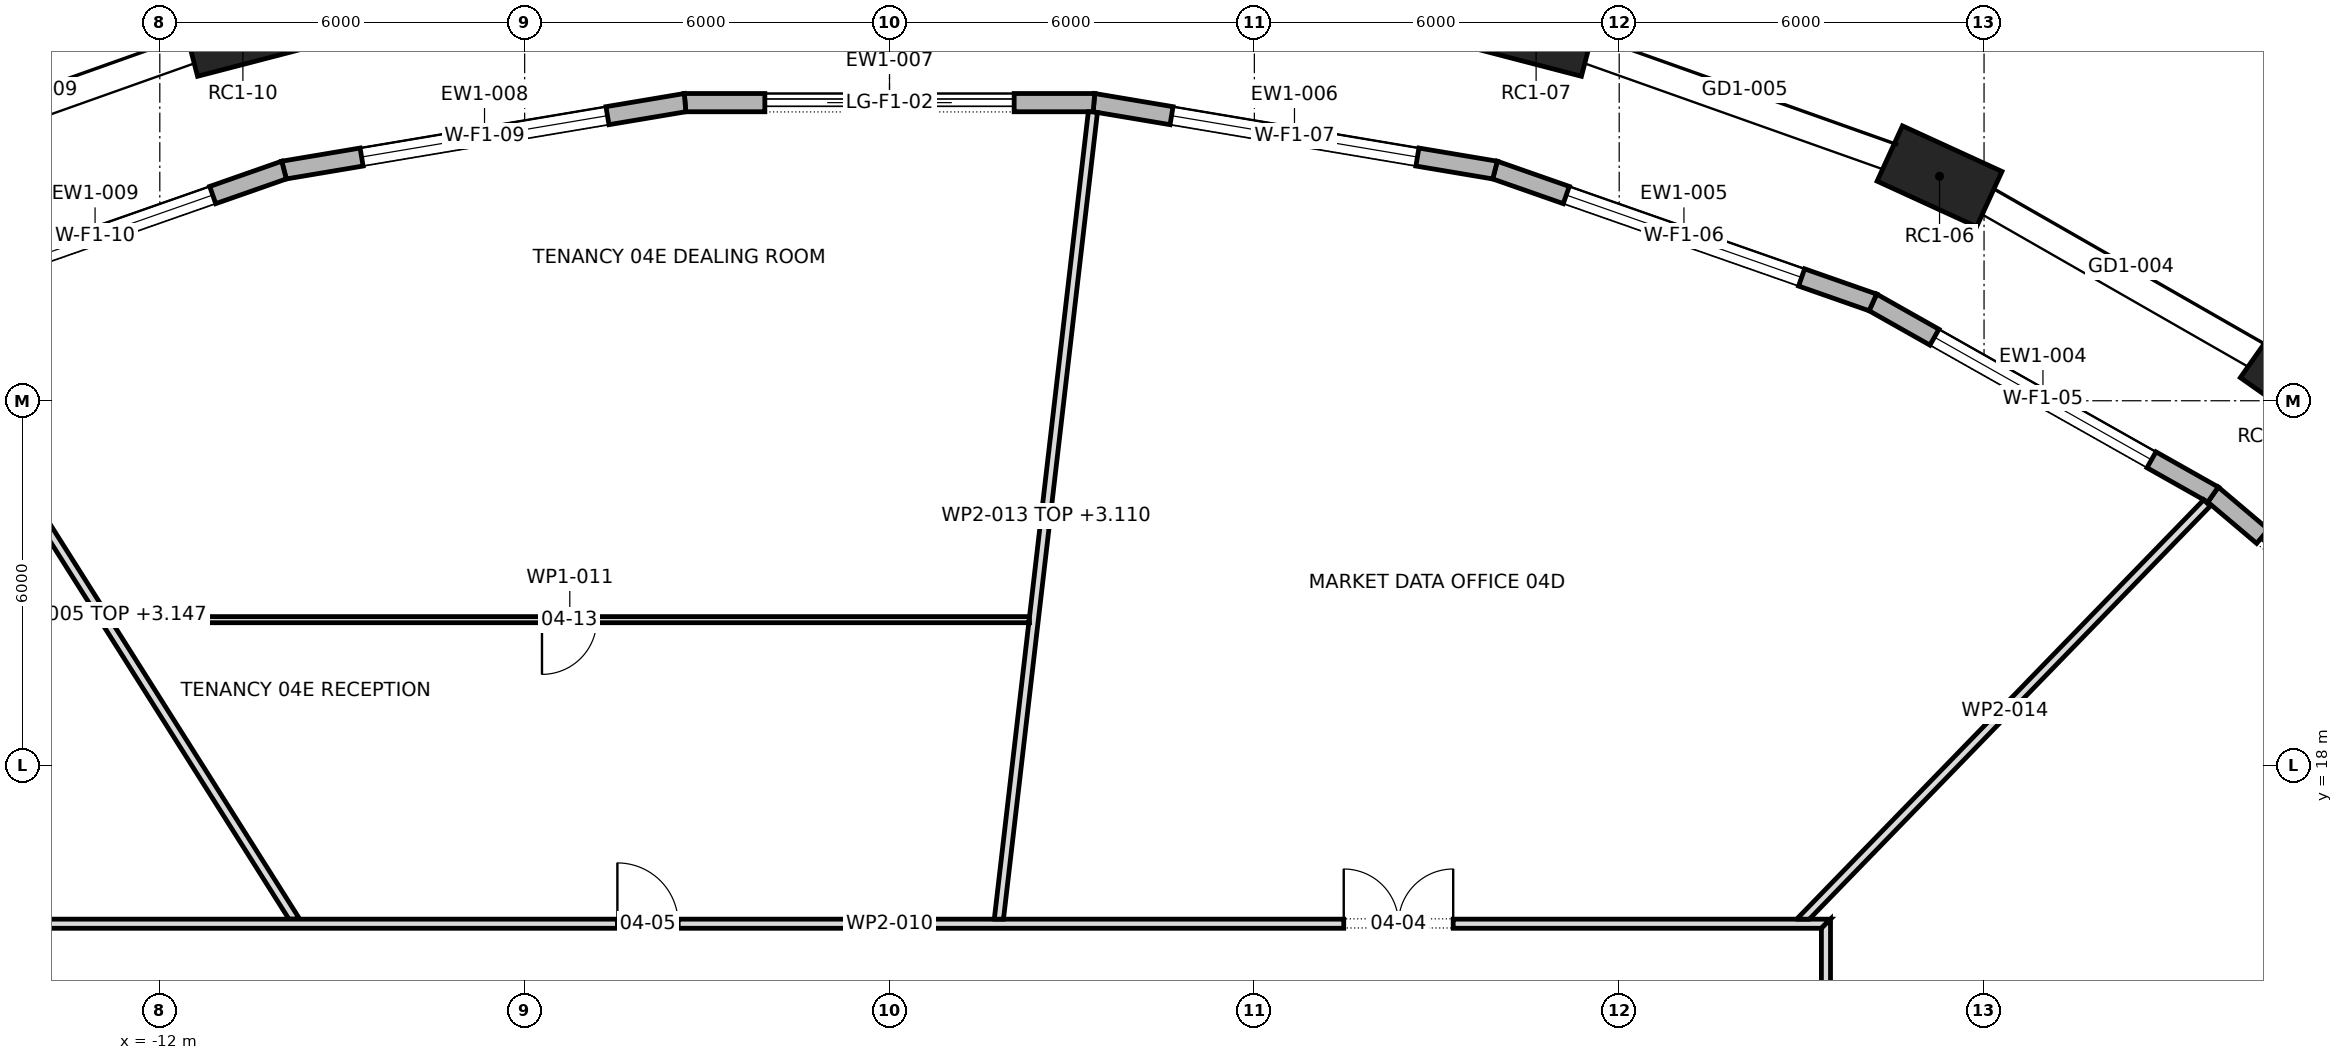
"""IFC4 building model, lengths in metres.
Left out: names, types, materials, properties, quantities, classifications, styles, units other than length and angle.
Written with IfcOpenShell. Run it as: python <this file> out.ifc"""

import sys

from ifc_helpers import new_model, si_unit, direction, frame, frame_2d, origin, origin_2d, place, context, subcontext, project, spatial, polyline, rectangle, outline, extrude, element, fill, save


model = new_model("IFC4")
c1 = context("Model", 3, precision=1e-05, world=origin(), true_north=direction((0.0, 1.0)))
c2 = subcontext(c1, "Body", "Model", "MODEL_VIEW")
j1 = project(units=[si_unit("LENGTHUNIT", "METRE"), si_unit("PLANEANGLEUNIT", "RADIAN")], contexts=[c1])
p1 = place(None, origin())
s1 = spatial("IfcSite", under=j1, at=p1, CompositionType="ELEMENT")
p2 = place(p1, origin())
s2 = spatial("IfcBuilding", under=s1, at=p2, CompositionType="ELEMENT")
p3 = place(p2, frame((0.0, 0.0, 69.7)))
s3 = spatial("IfcBuildingStorey", under=s2, at=p3, CompositionType="ELEMENT", Elevation=69.7)
for number, where, z_axis, x_axis in (
    (1, (23.239, 24.271, 0.0), (0.0, 0.0, 1.0), (-0.818, 0.575, 0.0)),
    (2, (17.268, 27.691, 0.0), (0.0, 0.0, 1.0), (-0.909, 0.417, 0.0)),
    (3, (10.634, 30.046, 0.0), (0.0, 0.0, 1.0), (-0.968, 0.252, 0.0)),
    (4, (-10.634, 30.046, 0.0), (0.0, 0.0, 1.0), (-0.968, -0.252, 0.0)),
):
    element("IfcColumn", number, at=place(p3, frame(where, z_axis=z_axis, x_axis=x_axis)), inside=s3, PredefinedType="COLUMN", context=c2, shape_type="SweptSolid", body=[
        extrude(rectangle(XDim=1.8, YDim=1.0, at=origin_2d()), origin(), (0.0, 0.0, 1.0), 4.2),
    ])
p4 = place(p3, frame((26.525, 18.434, 0.0), z_axis=(0.0, 0.0, 1.0), x_axis=(-0.763655167989, 0.645624336905, 0.0)))
e5 = element("IfcWall", 5, at=p4, inside=s3, PredefinedType="STANDARD", context=c2, shape_type="SweptSolid", body=[
    extrude(outline(polyline([(-0.015, -0.15), (6.246, -0.15), (6.218, 0.15), (0.015, 0.15), (-0.015, -0.15)])), origin(), (0.0, 0.0, 1.0), 3.9),
])
p5 = place(p4, frame((1.066, 0.0, 0.0)))
e6 = element("IfcOpeningElement", 6, at=p5, cuts=e5, PredefinedType="OPENING", context=c2, shape_type="SweptSolid", body=[
    extrude(rectangle(XDim=4.1, YDim=3.45, at=frame_2d((2.05, 1.725))), frame((0.0, 0.162, 0.0), z_axis=(0.0, -1.0, 0.0), x_axis=(1.0, 0.0, 0.0)), (0.0, 0.0, 1.0), 0.324),
])
p6 = place(p3, frame((21.766, 22.457, 0.0), z_axis=(0.0, 0.0, 1.0), x_axis=(-0.870673928577, 0.491860661262, 0.0)))
e7 = element("IfcWall", 7, at=p6, inside=s3, PredefinedType="STANDARD", context=c2, shape_type="SweptSolid", body=[
    extrude(outline(polyline([(-0.014, -0.15), (6.438, -0.15), (6.411, 0.15), (0.014, 0.15), (-0.014, -0.15)])), origin(), (0.0, 0.0, 1.0), 3.9),
])
p7 = place(p6, frame((1.163, 0.0, 0.6)))
e8 = element("IfcOpeningElement", 8, at=p7, cuts=e7, PredefinedType="OPENING", context=c2, shape_type="SweptSolid", body=[
    extrude(rectangle(XDim=4.1, YDim=2.85, at=frame_2d((2.05, 1.425))), frame((0.0, 0.162, 0.0), z_axis=(0.0, -1.0, 0.0), x_axis=(1.0, 0.0, 0.0)), (0.0, 0.0, 1.0), 0.324),
])
p8 = place(p3, frame((16.172, 25.617, 0.0), z_axis=(0.0, 0.0, 1.0), x_axis=(-0.94380689486, 0.330497420889, 0.0)))
e9 = element("IfcWall", 9, at=p8, inside=s3, PredefinedType="STANDARD", context=c2, shape_type="SweptSolid", body=[
    extrude(outline(polyline([(-0.013, -0.15), (6.597, -0.15), (6.571, 0.15), (0.013, 0.15), (-0.013, -0.15)])), origin(), (0.0, 0.0, 1.0), 3.9),
])
p9 = place(p8, frame((1.242, 0.0, 0.6)))
e10 = element("IfcOpeningElement", 10, at=p9, cuts=e9, PredefinedType="OPENING", context=c2, shape_type="SweptSolid", body=[
    extrude(rectangle(XDim=4.1, YDim=2.85, at=frame_2d((2.05, 1.425))), frame((0.0, 0.162, 0.0), z_axis=(0.0, -1.0, 0.0), x_axis=(1.0, 0.0, 0.0)), (0.0, 0.0, 1.0), 0.324),
])
p10 = place(p3, frame((9.958, 27.793, 0.0), z_axis=(0.0, 0.0, 1.0), x_axis=(-0.986153133093, 0.165837263877, 0.0)))
e11 = element("IfcWall", 11, at=p10, inside=s3, PredefinedType="STANDARD", context=c2, shape_type="SweptSolid", body=[
    extrude(outline(polyline([(-0.013, -0.15), (6.7, -0.15), (6.676, 0.15), (0.013, 0.15), (-0.013, -0.15)])), origin(), (0.0, 0.0, 1.0), 3.9),
])
p11 = place(p10, frame((1.294, 0.0, 0.6)))
e12 = element("IfcOpeningElement", 12, at=p11, cuts=e11, PredefinedType="OPENING", context=c2, shape_type="SweptSolid", body=[
    extrude(rectangle(XDim=4.1, YDim=2.85, at=frame_2d((2.05, 1.425))), frame((0.0, 0.162, 0.0), z_axis=(0.0, -1.0, 0.0), x_axis=(1.0, 0.0, 0.0)), (0.0, 0.0, 1.0), 0.324),
])
p12 = place(p3, frame((3.362, 28.903, 0.0), z_axis=(0.0, 0.0, 1.0), x_axis=(-1.0, 0.0, 0.0)))
e13 = element("IfcWall", 13, at=p12, inside=s3, PredefinedType="STANDARD", context=c2, shape_type="SweptSolid", body=[
    extrude(outline(polyline([(-0.012, -0.15), (6.737, -0.15), (6.712, 0.15), (0.012, 0.15), (-0.012, -0.15)])), origin(), (0.0, 0.0, 1.0), 3.9),
])
p13 = place(p12, frame((1.312, 0.0, 0.0)))
e14 = element("IfcOpeningElement", 14, at=p13, cuts=e13, PredefinedType="OPENING", context=c2, shape_type="SweptSolid", body=[
    extrude(rectangle(XDim=4.1, YDim=3.45, at=frame_2d((2.05, 1.725))), frame((0.0, 0.162, 0.0), z_axis=(0.0, -1.0, 0.0), x_axis=(1.0, 0.0, 0.0)), (0.0, 0.0, 1.0), 0.324),
])
p14 = place(p3, frame((-3.362, 28.903, 0.0), z_axis=(0.0, 0.0, 1.0), x_axis=(-0.986153133093, -0.165837263877, 0.0)))
e15 = element("IfcWall", 15, at=p14, inside=s3, PredefinedType="STANDARD", context=c2, shape_type="SweptSolid", body=[
    extrude(outline(polyline([(-0.012, -0.15), (6.701, -0.15), (6.675, 0.15), (0.012, 0.15), (-0.012, -0.15)])), origin(), (0.0, 0.0, 1.0), 3.9),
])
p15 = place(p14, frame((1.294, 0.0, 0.6)))
e16 = element("IfcOpeningElement", 16, at=p15, cuts=e15, PredefinedType="OPENING", context=c2, shape_type="SweptSolid", body=[
    extrude(rectangle(XDim=4.1, YDim=2.85, at=frame_2d((2.05, 1.425))), frame((0.0, 0.162, 0.0), z_axis=(0.0, -1.0, 0.0), x_axis=(1.0, 0.0, 0.0)), (0.0, 0.0, 1.0), 0.324),
])
p16 = place(p3, frame((-9.958, 27.793, 0.0), z_axis=(0.0, 0.0, 1.0), x_axis=(-0.94380689486, -0.330497420889, 0.0)))
e17 = element("IfcWall", 17, at=p16, inside=s3, PredefinedType="STANDARD", context=c2, shape_type="SweptSolid", body=[
    extrude(outline(polyline([(-0.013, -0.15), (6.597, -0.15), (6.571, 0.15), (0.013, 0.15), (-0.013, -0.15)])), origin(), (0.0, 0.0, 1.0), 3.9),
])
p17 = place(p16, frame((1.242, 0.0, 0.6)))
e18 = element("IfcOpeningElement", 18, at=p17, cuts=e17, PredefinedType="OPENING", context=c2, shape_type="SweptSolid", body=[
    extrude(rectangle(XDim=4.1, YDim=2.85, at=frame_2d((2.05, 1.425))), frame((0.0, 0.162, 0.0), z_axis=(0.0, -1.0, 0.0), x_axis=(1.0, 0.0, 0.0)), (0.0, 0.0, 1.0), 0.324),
])
p18 = place(p3, frame((-16.113, 25.482, 0.0), z_axis=(0.0, 0.0, 1.0), x_axis=(0.534334526362, -0.845273100209, 0.0)))
e19 = element("IfcWall", 19, at=p18, inside=s3, PredefinedType="PARTITIONING", context=c2, shape_type="SweptSolid", body=[
    extrude(outline(polyline([(0.0, -0.075), (1.965, -0.075), (3.93, -0.075), (5.896, -0.075), (7.861, -0.075), (9.826, -0.075), (11.791, -0.075), (11.886, 0.075), (11.886, 0.075), (9.964, 0.075), (8.041, 0.075), (6.119, 0.075), (6.118, 0.073), (6.115, 0.075), (4.591, 0.075), (3.068, 0.075), (1.544, 0.075), (0.02, 0.075), (0.003, 0.002), (0.0, -0.069), (0.0, -0.075)])), origin(), (0.0, 0.0, 1.0), 3.147),
])
p19 = place(p3, frame((-15.475, 15.4, 0.0), z_axis=(0.0, 0.0, 1.0), x_axis=(1.0, 0.0, 0.0)))
e20 = element("IfcWall", 20, at=p19, inside=s3, PredefinedType="PARTITIONING", context=c2, shape_type="SweptSolid", body=[
    extrude(outline(polyline([(0.15, -0.075), (2.066, -0.075), (3.981, -0.075), (5.897, -0.075), (7.812, -0.075), (9.728, -0.075), (11.644, -0.075), (13.56, -0.075), (15.475, -0.075), (17.391, -0.075), (19.306, -0.075), (21.222, -0.075), (23.138, -0.075), (25.053, -0.075), (26.969, -0.075), (28.885, -0.075), (30.8, -0.075), (30.95, 0.075), (29.016, 0.075), (27.081, 0.075), (25.147, 0.075), (23.212, 0.075), (21.278, 0.075), (19.344, 0.075), (17.409, 0.075), (15.475, 0.075), (13.541, 0.075), (11.606, 0.075), (9.672, 0.075), (7.738, 0.075), (5.803, 0.075), (3.869, 0.075), (1.935, 0.075), (0.0, 0.075), (0.15, -0.075)])), origin(), (0.0, 0.0, 1.0), 3.9),
])
p20 = place(p19, frame((22.945, 0.0, 0.0)))
e21 = element("IfcOpeningElement", 21, at=p20, cuts=e20, PredefinedType="OPENING", context=c2, shape_type="SweptSolid", body=[
    extrude(rectangle(XDim=1.8, YDim=2.1, at=frame_2d((0.9, 1.05))), frame((0.0, 0.087, 0.0), z_axis=(0.0, -1.0, 0.0), x_axis=(1.0, 0.0, 0.0)), (0.0, 0.0, 1.0), 0.174),
])
p21 = place(p19, frame((11.0, 0.0, 0.0)))
e22 = element("IfcOpeningElement", 22, at=p21, cuts=e20, PredefinedType="OPENING", context=c2, shape_type="SweptSolid", body=[
    extrude(rectangle(XDim=1.0, YDim=2.1, at=frame_2d((0.5, 1.05))), frame((0.0, 0.087, 0.0), z_axis=(0.0, -1.0, 0.0), x_axis=(1.0, 0.0, 0.0)), (0.0, 0.0, 1.0), 0.174),
])
p22 = place(p3, frame((-12.843, 20.4, 0.0), z_axis=(0.0, 0.0, 1.0), x_axis=(1.0, 0.0, 0.0)))
e23 = element("IfcWall", 23, at=p22, inside=s3, PredefinedType="PARTITIONING", context=c2, shape_type="SweptSolid", body=[
    extrude(outline(polyline([(0.063, -0.05), (1.947, -0.05), (3.831, -0.05), (5.714, -0.05), (7.598, -0.05), (9.482, -0.05), (11.366, -0.05), (13.25, -0.05), (15.134, -0.05), (15.146, 0.049), (15.146, 0.05), (13.252, 0.05), (11.359, 0.05), (9.466, 0.05), (7.573, 0.05), (5.68, 0.05), (3.786, 0.05), (1.893, 0.05), (0.0, 0.05), (0.0, 0.049), (0.063, -0.05)])), origin(), (0.0, 0.0, 1.0), 3.9),
])
p23 = place(p22, frame((7.128, 0.0, 0.0)))
e24 = element("IfcOpeningElement", 24, at=p23, cuts=e23, PredefinedType="OPENING", context=c2, shape_type="SweptSolid", body=[
    extrude(rectangle(XDim=0.9, YDim=2.1, at=frame_2d((0.45, 1.05))), frame((0.0, 0.062, 0.0), z_axis=(0.0, -1.0, 0.0), x_axis=(1.0, 0.0, 0.0)), (0.0, 0.0, 1.0), 0.124),
])
p24 = place(p3, frame((1.798, 15.467, 0.0), z_axis=(0.0, 0.0, 1.0), x_axis=(0.115693975805, 0.993284905736, 0.0)))
e25 = element("IfcWall", 25, at=p24, inside=s3, PredefinedType="PARTITIONING", context=c2, shape_type="SweptSolid", body=[
    extrude(outline(polyline([(13.373, -0.075), (13.373, 0.028), (13.367, 0.075), (11.695, 0.075), (10.022, 0.075), (8.35, 0.075), (6.678, 0.075), (5.005, 0.075), (4.909, 0.064), (4.908, 0.075), (3.272, 0.075), (1.636, 0.075), (0.0, 0.075), (0.0, 0.073), (0.017, -0.075), (1.925, -0.075), (3.833, -0.075), (5.741, -0.075), (7.649, -0.075), (9.557, -0.075), (11.465, -0.075), (13.373, -0.075)])), origin(), (0.0, 0.0, 1.0), 3.11),
])
p25 = place(p3, frame((14.972, 15.423, 0.0), z_axis=(0.0, 0.0, 1.0), x_axis=(0.696498460967, 0.717558286044, 0.0)))
e26 = element("IfcWall", 26, at=p25, inside=s3, PredefinedType="PARTITIONING", context=c2, shape_type="SweptSolid", body=[
    extrude(outline(polyline([(0.0, 0.075), (0.0, 0.074), (0.145, -0.075), (2.038, -0.075), (3.931, -0.075), (5.824, -0.075), (7.717, -0.075), (9.61, -0.075), (9.61, 0.075), (7.688, 0.075), (5.766, 0.075), (3.844, 0.075), (1.922, 0.075), (0.0, 0.075)])), origin(), (0.0, 0.0, 1.0), 3.9),
])
p26 = place(p3, frame((15.4, -15.475, 0.0), z_axis=(0.0, 0.0, 1.0), x_axis=(0.0, 1.0, 0.0)))
e27 = element("IfcWall", 27, at=p26, inside=s3, PredefinedType="PARTITIONING", context=c2, shape_type="SweptSolid", body=[
    extrude(outline(polyline([(0.0, -0.075), (1.935, -0.075), (3.869, -0.075), (5.803, -0.075), (7.738, -0.075), (9.672, -0.075), (11.606, -0.075), (13.541, -0.075), (15.475, -0.075), (17.409, -0.075), (19.344, -0.075), (21.278, -0.075), (23.212, -0.075), (25.147, -0.075), (27.081, -0.075), (29.016, -0.075), (30.95, -0.075), (30.8, 0.075), (28.885, 0.075), (26.969, 0.075), (25.053, 0.075), (23.138, 0.075), (21.222, 0.075), (19.306, 0.075), (17.391, 0.075), (15.475, 0.075), (13.56, 0.075), (11.644, 0.075), (9.728, 0.075), (7.812, 0.075), (5.897, 0.075), (3.981, 0.075), (2.066, 0.075), (0.15, 0.075), (0.0, -0.075)])), origin(), (0.0, 0.0, 1.0), 3.9),
])
p27 = place(p26, frame((4.9, 0.0, 0.0)))
e28 = element("IfcOpeningElement", 28, at=p27, cuts=e27, PredefinedType="OPENING", context=c2, shape_type="SweptSolid", body=[
    extrude(rectangle(XDim=1.8, YDim=2.1, at=frame_2d((0.9, 1.05))), frame((0.0, 0.087, 0.0), z_axis=(0.0, -1.0, 0.0), x_axis=(1.0, 0.0, 0.0)), (0.0, 0.0, 1.0), 0.174),
])
p28 = place(p26, frame((14.975, 0.0, 0.0)))
e29 = element("IfcOpeningElement", 29, at=p28, cuts=e27, PredefinedType="OPENING", context=c2, shape_type="SweptSolid", body=[
    extrude(rectangle(XDim=1.0, YDim=2.1, at=frame_2d((0.5, 1.05))), frame((0.0, 0.087, 0.0), z_axis=(0.0, -1.0, 0.0), x_axis=(1.0, 0.0, 0.0)), (0.0, 0.0, 1.0), 0.174),
])
p29 = place(p26, frame((24.25, 0.0, 0.0)))
e30 = element("IfcOpeningElement", 30, at=p29, cuts=e27, PredefinedType="OPENING", context=c2, shape_type="SweptSolid", body=[
    extrude(rectangle(XDim=1.8, YDim=2.1, at=frame_2d((0.9, 1.05))), frame((0.0, 0.087, 0.0), z_axis=(0.0, -1.0, 0.0), x_axis=(1.0, 0.0, 0.0)), (0.0, 0.0, 1.0), 0.174),
])
p30 = place(p5, origin())
e31 = element("IfcDoor", 31, at=p30, inside=s3, OperationType="DOUBLE_DOOR_SLIDING", PredefinedType="DOOR", context=c2, shape_type="SweptSolid", body=[
    extrude(rectangle(XDim=4.1, YDim=3.45, at=frame_2d((2.05, 1.725))), frame((0.0, 0.025, 0.0), z_axis=(0.0, -1.0, 0.0), x_axis=(1.0, 0.0, 0.0)), (0.0, 0.0, 1.0), 0.05),
])
fill(e6, e31)
p31 = place(p7, origin())
e32 = element("IfcWindow", 32, at=p31, inside=s3, PartitioningType="TRIPLE_PANEL_VERTICAL", PredefinedType="WINDOW", context=c2, shape_type="SweptSolid", body=[
    extrude(rectangle(XDim=4.1, YDim=2.85, at=frame_2d((2.05, 1.425))), frame((0.0, 0.03, 0.0), z_axis=(0.0, -1.0, 0.0), x_axis=(1.0, 0.0, 0.0)), (0.0, 0.0, 1.0), 0.06),
])
fill(e8, e32)
p32 = place(p9, origin())
e33 = element("IfcWindow", 33, at=p32, inside=s3, PartitioningType="TRIPLE_PANEL_VERTICAL", PredefinedType="WINDOW", context=c2, shape_type="SweptSolid", body=[
    extrude(rectangle(XDim=4.1, YDim=2.85, at=frame_2d((2.05, 1.425))), frame((0.0, 0.03, 0.0), z_axis=(0.0, -1.0, 0.0), x_axis=(1.0, 0.0, 0.0)), (0.0, 0.0, 1.0), 0.06),
])
fill(e10, e33)
p33 = place(p11, origin())
e34 = element("IfcWindow", 34, at=p33, inside=s3, PartitioningType="TRIPLE_PANEL_VERTICAL", PredefinedType="WINDOW", context=c2, shape_type="SweptSolid", body=[
    extrude(rectangle(XDim=4.1, YDim=2.85, at=frame_2d((2.05, 1.425))), frame((0.0, 0.03, 0.0), z_axis=(0.0, -1.0, 0.0), x_axis=(1.0, 0.0, 0.0)), (0.0, 0.0, 1.0), 0.06),
])
fill(e12, e34)
p34 = place(p13, origin())
e35 = element("IfcDoor", 35, at=p34, inside=s3, OperationType="DOUBLE_DOOR_SLIDING", PredefinedType="DOOR", context=c2, shape_type="SweptSolid", body=[
    extrude(rectangle(XDim=4.1, YDim=3.45, at=frame_2d((2.05, 1.725))), frame((0.0, 0.025, 0.0), z_axis=(0.0, -1.0, 0.0), x_axis=(1.0, 0.0, 0.0)), (0.0, 0.0, 1.0), 0.05),
])
fill(e14, e35)
p35 = place(p15, origin())
e36 = element("IfcWindow", 36, at=p35, inside=s3, PartitioningType="TRIPLE_PANEL_VERTICAL", PredefinedType="WINDOW", context=c2, shape_type="SweptSolid", body=[
    extrude(rectangle(XDim=4.1, YDim=2.85, at=frame_2d((2.05, 1.425))), frame((0.0, 0.03, 0.0), z_axis=(0.0, -1.0, 0.0), x_axis=(1.0, 0.0, 0.0)), (0.0, 0.0, 1.0), 0.06),
])
fill(e16, e36)
p36 = place(p17, origin())
e37 = element("IfcWindow", 37, at=p36, inside=s3, PartitioningType="TRIPLE_PANEL_VERTICAL", PredefinedType="WINDOW", context=c2, shape_type="SweptSolid", body=[
    extrude(rectangle(XDim=4.1, YDim=2.85, at=frame_2d((2.05, 1.425))), frame((0.0, 0.03, 0.0), z_axis=(0.0, -1.0, 0.0), x_axis=(1.0, 0.0, 0.0)), (0.0, 0.0, 1.0), 0.06),
])
fill(e18, e37)
p37 = place(p20, origin())
e38 = element("IfcDoor", 38, at=p37, inside=s3, OperationType="DOUBLE_DOOR_SINGLE_SWING", PredefinedType="DOOR", context=c2, shape_type="SweptSolid", body=[
    extrude(rectangle(XDim=1.8, YDim=2.1, at=frame_2d((0.9, 1.05))), frame((0.0, 0.025, 0.0), z_axis=(0.0, -1.0, 0.0), x_axis=(1.0, 0.0, 0.0)), (0.0, 0.0, 1.0), 0.05),
])
fill(e21, e38)
p38 = place(p21, origin())
e39 = element("IfcDoor", 39, at=p38, inside=s3, OperationType="SINGLE_SWING_RIGHT", PredefinedType="DOOR", context=c2, shape_type="SweptSolid", body=[
    extrude(rectangle(XDim=1.0, YDim=2.1, at=frame_2d((0.5, 1.05))), frame((0.0, 0.025, 0.0), z_axis=(0.0, -1.0, 0.0), x_axis=(1.0, 0.0, 0.0)), (0.0, 0.0, 1.0), 0.05),
])
fill(e22, e39)
p39 = place(p23, frame((0.9, 0.0, 0.0), z_axis=(0.0, 0.0, 1.0), x_axis=(-1.0, 0.0, 0.0)))
e40 = element("IfcDoor", 40, at=p39, inside=s3, OperationType="SINGLE_SWING_LEFT", PredefinedType="DOOR", context=c2, shape_type="SweptSolid", body=[
    extrude(rectangle(XDim=0.9, YDim=2.1, at=frame_2d((0.45, 1.05))), frame((0.0, 0.025, 0.0), z_axis=(0.0, -1.0, 0.0), x_axis=(1.0, 0.0, 0.0)), (0.0, 0.0, 1.0), 0.05),
])
fill(e24, e40)
save(model, sys.argv[1])
